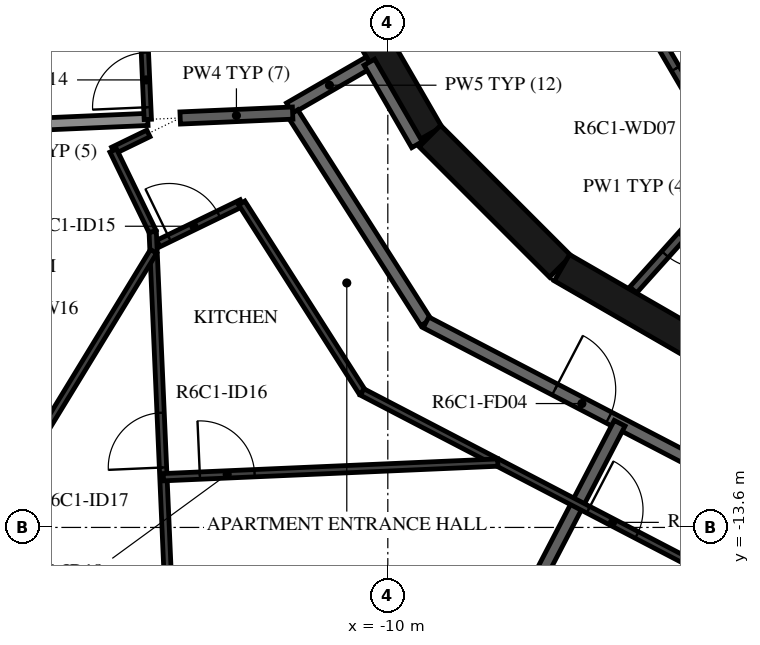
"""IFC4 building model, lengths in metres.
Left out: names, types, materials, properties, quantities, classifications, styles, units other than length and angle.
Written with IfcOpenShell. Run it as: python <this file> out.ifc"""

import sys

from ifc_helpers import new_model, si_unit, direction, frame, frame_2d, origin, place, context, subcontext, project, spatial, rectangle, extrude, element, fill, save


model = new_model("IFC4")
c1 = context("Model", 3, precision=1e-05, world=origin(), true_north=direction((0.0, 1.0)))
c2 = subcontext(c1, "Body", "Model", "MODEL_VIEW")
j1 = project(units=[si_unit("LENGTHUNIT", "METRE"), si_unit("PLANEANGLEUNIT", "RADIAN")], contexts=[c1])
p1 = place(None, origin())
s1 = spatial("IfcSite", under=j1, at=p1, CompositionType="ELEMENT")
p2 = place(p1, origin())
s2 = spatial("IfcBuilding", under=s1, at=p2, CompositionType="ELEMENT")
p3 = place(p2, frame((0.0, 0.0, 251.2)))
s3 = spatial("IfcBuildingStorey", under=s2, at=p3, CompositionType="ELEMENT", Elevation=251.2)
p4 = place(p3, frame((-10.845, -4.51, 0.0), z_axis=(0.0, 0.0, 1.0), x_axis=(0.500087131594, -0.865975092491, 0.0)))
e1 = element("IfcWall", 1, at=p4, inside=s3, PredefinedType="SHEAR", context=c2, shape_type="SweptSolid", body=[
    extrude(rectangle(XDim=3.033, YDim=0.5, at=frame_2d((1.516, 0.0))), origin(), (0.0, 0.0, 1.0), 3.12),
])
p5 = place(p3, frame((-9.308, -7.164, 0.0), z_axis=(0.0, 0.0, 1.0), x_axis=(0.707106781187, -0.707106781187, 0.0)))
e2 = element("IfcWall", 2, at=p5, inside=s3, PredefinedType="SHEAR", context=c2, shape_type="SweptSolid", body=[
    extrude(rectangle(XDim=3.032, YDim=0.5, at=frame_2d((1.516, 0.0))), origin(), (0.0, 0.0, 1.0), 3.12),
])
p6 = place(p3, frame((-7.137, -9.329, 0.0), z_axis=(0.0, 0.0, 1.0), x_axis=(0.865975092491, -0.500087131594, 0.0)))
e3 = element("IfcWall", 3, at=p6, inside=s3, PredefinedType="SHEAR", context=c2, shape_type="SweptSolid", body=[
    extrude(rectangle(XDim=3.033, YDim=0.5, at=frame_2d((1.516, 0.0))), origin(), (0.0, 0.0, 1.0), 3.12),
])
p7 = place(p3, frame((-5.829, -5.102, 0.0), z_axis=(0.0, 0.0, 1.0), x_axis=(0.504480008384, -0.863423373057, 0.0)))
e4 = element("IfcWall", 4, at=p7, inside=s3, PredefinedType="PARTITIONING", context=c2, shape_type="SweptSolid", body=[
    extrude(rectangle(XDim=3.115, YDim=0.15, at=frame_2d((1.558, 0.0))), origin(), (0.0, 0.0, 1.0), 3.12),
])
p8 = place(p7, frame((1.107, 0.0, 0.0)))
e5 = element("IfcOpeningElement", 5, at=p8, cuts=e4, PredefinedType="OPENING", context=c2, shape_type="SweptSolid", body=[
    extrude(rectangle(XDim=0.9, YDim=2.1, at=frame_2d((0.45, 1.05))), frame((0.0, 0.085, 0.0), z_axis=(0.0, -1.0, 0.0), x_axis=(1.0, 0.0, 0.0)), (0.0, 0.0, 1.0), 0.17),
])
p9 = place(p3, frame((-4.311, -7.851, 0.0), z_axis=(0.0, 0.0, 1.0), x_axis=(-0.667869133096, -0.744278725383, 0.0)))
e6 = element("IfcWall", 6, at=p9, inside=s3, PredefinedType="PARTITIONING", context=c2, shape_type="SweptSolid", body=[
    extrude(rectangle(XDim=2.476, YDim=0.15, at=frame_2d((1.238, 0.0))), origin(), (0.0, 0.0, 1.0), 3.12),
])
p10 = place(p9, frame((0.788, 0.0, 0.0)))
e7 = element("IfcOpeningElement", 7, at=p10, cuts=e6, PredefinedType="OPENING", context=c2, shape_type="SweptSolid", body=[
    extrude(rectangle(XDim=0.9, YDim=2.1, at=frame_2d((0.45, 1.05))), frame((0.0, 0.085, 0.0), z_axis=(0.0, -1.0, 0.0), x_axis=(1.0, 0.0, 0.0)), (0.0, 0.0, 1.0), 0.17),
])
p11 = place(p3, frame((-10.303, -5.949, 0.0), z_axis=(0.0, 0.0, 1.0), x_axis=(-0.866043382451, -0.499968858743, 0.0)))
e8 = element("IfcWall", 8, at=p11, inside=s3, PredefinedType="STANDARD", context=c2, shape_type="SweptSolid", body=[
    extrude(rectangle(XDim=1.515, YDim=0.2, at=frame_2d((0.758, 0.0))), origin(), (0.0, 0.0, 1.0), 3.12),
])
p12 = place(p3, frame((-9.52, -7.305, 0.0), z_axis=(0.0, 0.0, 1.0), x_axis=(-0.500028278809, 0.866009076391, 0.0)))
e9 = element("IfcWall", 9, at=p12, inside=s3, PredefinedType="STANDARD", context=c2, shape_type="SweptSolid", body=[
    extrude(rectangle(XDim=1.566, YDim=0.2, at=frame_2d((0.783, 0.0))), origin(), (0.0, 0.0, 1.0), 3.12),
])
p13 = place(p3, frame((-11.565, -6.786, 0.0), z_axis=(0.0, 0.0, 1.0), x_axis=(0.537297327359, -0.843392898958, 0.0)))
e10 = element("IfcWall", 10, at=p13, inside=s3, PredefinedType="STANDARD", context=c2, shape_type="SweptSolid", body=[
    extrude(rectangle(XDim=4.081, YDim=0.2, at=frame_2d((2.041, 0.0))), origin(), (0.0, 0.0, 1.0), 3.12),
])
p14 = place(p3, frame((-9.372, -10.228, 0.0), z_axis=(0.0, 0.0, 1.0), x_axis=(0.887005184532, -0.461759464021, 0.0)))
e11 = element("IfcWall", 11, at=p14, inside=s3, PredefinedType="STANDARD", context=c2, shape_type="SweptSolid", body=[
    extrude(rectangle(XDim=7.181, YDim=0.2, at=frame_2d((3.591, 0.0))), origin(), (0.0, 0.0, 1.0), 3.12),
])
p15 = place(p14, frame((2.391, 0.0, 0.0)))
e12 = element("IfcOpeningElement", 12, at=p15, cuts=e11, PredefinedType="OPENING", context=c2, shape_type="SweptSolid", body=[
    extrude(rectangle(XDim=1.0, YDim=2.1, at=frame_2d((0.5, 1.05))), frame((0.0, 0.11, 0.0), z_axis=(0.0, -1.0, 0.0), x_axis=(1.0, 0.0, 0.0)), (0.0, 0.0, 1.0), 0.22),
])
p16 = place(p3, frame((-17.544, -7.047, 0.0), z_axis=(0.0, 0.0, 1.0), x_axis=(0.999045894436, 0.043672655174, 0.0)))
e13 = element("IfcWall", 13, at=p16, inside=s3, PredefinedType="STANDARD", context=c2, shape_type="SweptSolid", body=[
    extrude(rectangle(XDim=3.6, YDim=0.2, at=frame_2d((1.8, 0.0))), origin(), (0.0, 0.0, 1.0), 2.73),
])
p17 = place(p3, frame((-13.414, -6.867, 0.0), z_axis=(0.0, 0.0, 1.0), x_axis=(0.999046427216, 0.043660465726, 0.0)))
e14 = element("IfcWall", 14, at=p17, inside=s3, PredefinedType="STANDARD", context=c2, shape_type="SweptSolid", body=[
    extrude(rectangle(XDim=1.851, YDim=0.2, at=frame_2d((0.925, 0.0))), origin(), (0.0, 0.0, 1.0), 3.12),
])
p18 = place(p3, frame((-7.541, -14.486, 0.0), z_axis=(0.0, 0.0, 1.0), x_axis=(0.461746051786, 0.88701216658, 0.0)))
e15 = element("IfcWall", 15, at=p18, inside=s3, PredefinedType="STANDARD", context=c2, shape_type="SweptSolid", body=[
    extrude(rectangle(XDim=2.931, YDim=0.2, at=frame_2d((1.466, 0.0))), origin(), (0.0, 0.0, 1.0), 3.12),
])
p19 = place(p3, frame((-13.947, -6.89, 0.0), z_axis=(0.0, 0.0, 1.0), x_axis=(-0.043680814195, 0.999045537737, 0.0)))
e16 = element("IfcWall", 16, at=p19, inside=s3, PredefinedType="PARTITIONING", context=c2, shape_type="SweptSolid", body=[
    extrude(rectangle(XDim=2.392, YDim=0.12, at=frame_2d((1.196, 0.0))), origin(), (0.0, 0.0, 1.0), 3.12),
])
p20 = place(p19, frame((0.2, 0.0, 0.0)))
e17 = element("IfcOpeningElement", 17, at=p20, cuts=e16, PredefinedType="OPENING", context=c2, shape_type="SweptSolid", body=[
    extrude(rectangle(XDim=0.9, YDim=2.1, at=frame_2d((0.45, 1.05))), frame((0.0, 0.07, 0.0), z_axis=(0.0, -1.0, 0.0), x_axis=(1.0, 0.0, 0.0)), (0.0, 0.0, 1.0), 0.14),
])
p21 = place(p3, frame((-13.937, -7.121, 0.0), z_axis=(0.0, 0.0, 1.0), x_axis=(-0.899601864835, -0.436710985418, 0.0)))
e18 = element("IfcWall", 18, at=p21, inside=s3, PredefinedType="PARTITIONING", context=c2, shape_type="SweptSolid", body=[
    extrude(rectangle(XDim=0.644, YDim=0.12, at=frame_2d((0.322, 0.0))), origin(), (0.0, 0.0, 1.0), 3.12),
])
p22 = place(p3, frame((-14.516, -7.402, 0.0), z_axis=(0.0, 0.0, 1.0), x_axis=(0.436676244377, -0.899618729016, 0.0)))
e19 = element("IfcWall", 19, at=p22, inside=s3, PredefinedType="PARTITIONING", context=c2, shape_type="SweptSolid", body=[
    extrude(rectangle(XDim=1.487, YDim=0.12, at=frame_2d((0.744, 0.0))), origin(), (0.0, 0.0, 1.0), 3.12),
])
p23 = place(p3, frame((-13.773, -8.931, 0.0), z_axis=(0.0, 0.0, 1.0), x_axis=(0.899585443678, 0.436744810527, 0.0)))
e20 = element("IfcWall", 20, at=p23, inside=s3, PredefinedType="PARTITIONING", context=c2, shape_type="SweptSolid", body=[
    extrude(rectangle(XDim=1.525, YDim=0.12, at=frame_2d((0.762, 0.0))), origin(), (0.0, 0.0, 1.0), 3.12),
])
p24 = place(p23, frame((0.2, 0.0, 0.0)))
e21 = element("IfcOpeningElement", 21, at=p24, cuts=e20, PredefinedType="OPENING", context=c2, shape_type="SweptSolid", body=[
    extrude(rectangle(XDim=0.9, YDim=2.1, at=frame_2d((0.45, 1.05))), frame((0.0, 0.07, 0.0), z_axis=(0.0, -1.0, 0.0), x_axis=(1.0, 0.0, 0.0)), (0.0, 0.0, 1.0), 0.14),
])
p25 = place(p3, frame((-12.402, -8.265, 0.0), z_axis=(0.0, 0.0, 1.0), x_axis=(0.537321213777, -0.843377681247, 0.0)))
e22 = element("IfcWall", 22, at=p25, inside=s3, PredefinedType="PARTITIONING", context=c2, shape_type="SweptSolid", body=[
    extrude(rectangle(XDim=3.685, YDim=0.12, at=frame_2d((1.843, 0.0))), origin(), (0.0, 0.0, 1.0), 3.12),
])
p26 = place(p3, frame((-10.421, -11.373, 0.0), z_axis=(0.0, 0.0, 1.0), x_axis=(0.887012970857, -0.461744506769, 0.0)))
e23 = element("IfcWall", 23, at=p26, inside=s3, PredefinedType="PARTITIONING", context=c2, shape_type="SweptSolid", body=[
    extrude(rectangle(XDim=7.985, YDim=0.12, at=frame_2d((3.992, 0.0))), origin(), (0.0, 0.0, 1.0), 3.12),
])
p27 = place(p26, frame((4.192, 0.0, 0.0)))
e24 = element("IfcOpeningElement", 24, at=p27, cuts=e23, PredefinedType="OPENING", context=c2, shape_type="SweptSolid", body=[
    extrude(rectangle(XDim=0.9, YDim=2.1, at=frame_2d((0.45, 1.05))), frame((0.0, 0.07, 0.0), z_axis=(0.0, -1.0, 0.0), x_axis=(1.0, 0.0, 0.0)), (0.0, 0.0, 1.0), 0.14),
])
p28 = place(p3, frame((-13.496, -17.218, 0.0), z_axis=(0.0, 0.0, 1.0), x_axis=(-0.043640714674, 0.999047290183, 0.0)))
e25 = element("IfcWall", 25, at=p28, inside=s3, PredefinedType="PARTITIONING", context=c2, shape_type="SweptSolid", body=[
    extrude(rectangle(XDim=8.487, YDim=0.12, at=frame_2d((4.243, 0.0))), origin(), (0.0, 0.0, 1.0), 3.12),
])
p29 = place(p28, frame((4.608, 0.0, 0.0)))
e26 = element("IfcOpeningElement", 26, at=p29, cuts=e25, PredefinedType="OPENING", context=c2, shape_type="SweptSolid", body=[
    extrude(rectangle(XDim=0.9, YDim=2.1, at=frame_2d((0.45, 1.05))), frame((0.0, 0.07, 0.0), z_axis=(0.0, -1.0, 0.0), x_axis=(1.0, 0.0, 0.0)), (0.0, 0.0, 1.0), 0.14),
])
p30 = place(p3, frame((-17.215, -14.57, 0.0), z_axis=(0.0, 0.0, 1.0), x_axis=(0.520949659667, 0.853587401555, 0.0)))
e27 = element("IfcWall", 27, at=p30, inside=s3, PredefinedType="PARTITIONING", context=c2, shape_type="SweptSolid", body=[
    extrude(rectangle(XDim=6.455, YDim=0.12, at=frame_2d((3.228, 0.0))), origin(), (0.0, 0.0, 1.0), 3.12),
])
p31 = place(p30, frame((1.2, 0.0, 0.0)))
e28 = element("IfcOpeningElement", 28, at=p31, cuts=e27, PredefinedType="OPENING", context=c2, shape_type="SweptSolid", body=[
    extrude(rectangle(XDim=0.9, YDim=2.1, at=frame_2d((0.45, 1.05))), frame((0.0, 0.07, 0.0), z_axis=(0.0, -1.0, 0.0), x_axis=(1.0, 0.0, 0.0)), (0.0, 0.0, 1.0), 0.14),
])
p32 = place(p3, frame((-13.69, -12.774, 0.0), z_axis=(0.0, 0.0, 1.0), x_axis=(0.999048778431, 0.043606631553, 0.0)))
e29 = element("IfcWall", 29, at=p32, inside=s3, PredefinedType="PARTITIONING", context=c2, shape_type="SweptSolid", body=[
    extrude(rectangle(XDim=5.503, YDim=0.12, at=frame_2d((2.752, 0.0))), origin(), (0.0, 0.0, 1.0), 3.12),
])
p33 = place(p32, frame((0.6, 0.0, 0.0)))
e30 = element("IfcOpeningElement", 30, at=p33, cuts=e29, PredefinedType="OPENING", context=c2, shape_type="SweptSolid", body=[
    extrude(rectangle(XDim=0.9, YDim=2.1, at=frame_2d((0.45, 1.05))), frame((0.0, 0.07, 0.0), z_axis=(0.0, -1.0, 0.0), x_axis=(1.0, 0.0, 0.0)), (0.0, 0.0, 1.0), 0.14),
])
p34 = place(p10, origin())
e31 = element("IfcDoor", 31, at=p34, inside=s3, OperationType="SINGLE_SWING_RIGHT", PredefinedType="DOOR", context=c2, shape_type="SweptSolid", body=[
    extrude(rectangle(XDim=0.9, YDim=2.1, at=frame_2d((0.45, 1.05))), frame((0.0, 0.025, 0.0), z_axis=(0.0, -1.0, 0.0), x_axis=(1.0, 0.0, 0.0)), (0.0, 0.0, 1.0), 0.05),
])
fill(e7, e31)
p35 = place(p8, origin())
e32 = element("IfcDoor", 32, at=p35, inside=s3, OperationType="SINGLE_SWING_LEFT", PredefinedType="DOOR", context=c2, shape_type="SweptSolid", body=[
    extrude(rectangle(XDim=0.9, YDim=2.1, at=frame_2d((0.45, 1.05))), frame((0.0, 0.025, 0.0), z_axis=(0.0, -1.0, 0.0), x_axis=(1.0, 0.0, 0.0)), (0.0, 0.0, 1.0), 0.05),
])
fill(e5, e32)
p36 = place(p20, origin())
e33 = element("IfcDoor", 33, at=p36, inside=s3, OperationType="SINGLE_SWING_LEFT", PredefinedType="DOOR", context=c2, shape_type="SweptSolid", body=[
    extrude(rectangle(XDim=0.9, YDim=2.1, at=frame_2d((0.45, 1.05))), frame((0.0, 0.025, 0.0), z_axis=(0.0, -1.0, 0.0), x_axis=(1.0, 0.0, 0.0)), (0.0, 0.0, 1.0), 0.05),
])
fill(e17, e33)
p37 = place(p15, origin())
e34 = element("IfcDoor", 34, at=p37, inside=s3, OperationType="SINGLE_SWING_RIGHT", PredefinedType="DOOR", context=c2, shape_type="SweptSolid", body=[
    extrude(rectangle(XDim=1.0, YDim=2.1, at=frame_2d((0.5, 1.05))), frame((0.0, 0.025, 0.0), z_axis=(0.0, -1.0, 0.0), x_axis=(1.0, 0.0, 0.0)), (0.0, 0.0, 1.0), 0.05),
])
fill(e12, e34)
p38 = place(p24, origin())
e35 = element("IfcDoor", 35, at=p38, inside=s3, OperationType="SINGLE_SWING_LEFT", PredefinedType="DOOR", context=c2, shape_type="SweptSolid", body=[
    extrude(rectangle(XDim=0.9, YDim=2.1, at=frame_2d((0.45, 1.05))), frame((0.0, 0.025, 0.0), z_axis=(0.0, -1.0, 0.0), x_axis=(1.0, 0.0, 0.0)), (0.0, 0.0, 1.0), 0.05),
])
fill(e21, e35)
p39 = place(p29, origin())
e36 = element("IfcDoor", 36, at=p39, inside=s3, OperationType="SINGLE_SWING_RIGHT", PredefinedType="DOOR", context=c2, shape_type="SweptSolid", body=[
    extrude(rectangle(XDim=0.9, YDim=2.1, at=frame_2d((0.45, 1.05))), frame((0.0, 0.025, 0.0), z_axis=(0.0, -1.0, 0.0), x_axis=(1.0, 0.0, 0.0)), (0.0, 0.0, 1.0), 0.05),
])
fill(e26, e36)
p40 = place(p33, origin())
e37 = element("IfcDoor", 37, at=p40, inside=s3, OperationType="SINGLE_SWING_RIGHT", PredefinedType="DOOR", context=c2, shape_type="SweptSolid", body=[
    extrude(rectangle(XDim=0.9, YDim=2.1, at=frame_2d((0.45, 1.05))), frame((0.0, 0.025, 0.0), z_axis=(0.0, -1.0, 0.0), x_axis=(1.0, 0.0, 0.0)), (0.0, 0.0, 1.0), 0.05),
])
fill(e30, e37)
p41 = place(p27, origin())
e38 = element("IfcDoor", 38, at=p41, inside=s3, OperationType="SINGLE_SWING_LEFT", PredefinedType="DOOR", context=c2, shape_type="SweptSolid", body=[
    extrude(rectangle(XDim=0.9, YDim=2.1, at=frame_2d((0.45, 1.05))), frame((0.0, 0.025, 0.0), z_axis=(0.0, -1.0, 0.0), x_axis=(1.0, 0.0, 0.0)), (0.0, 0.0, 1.0), 0.05),
])
fill(e24, e38)
save(model, sys.argv[1])
